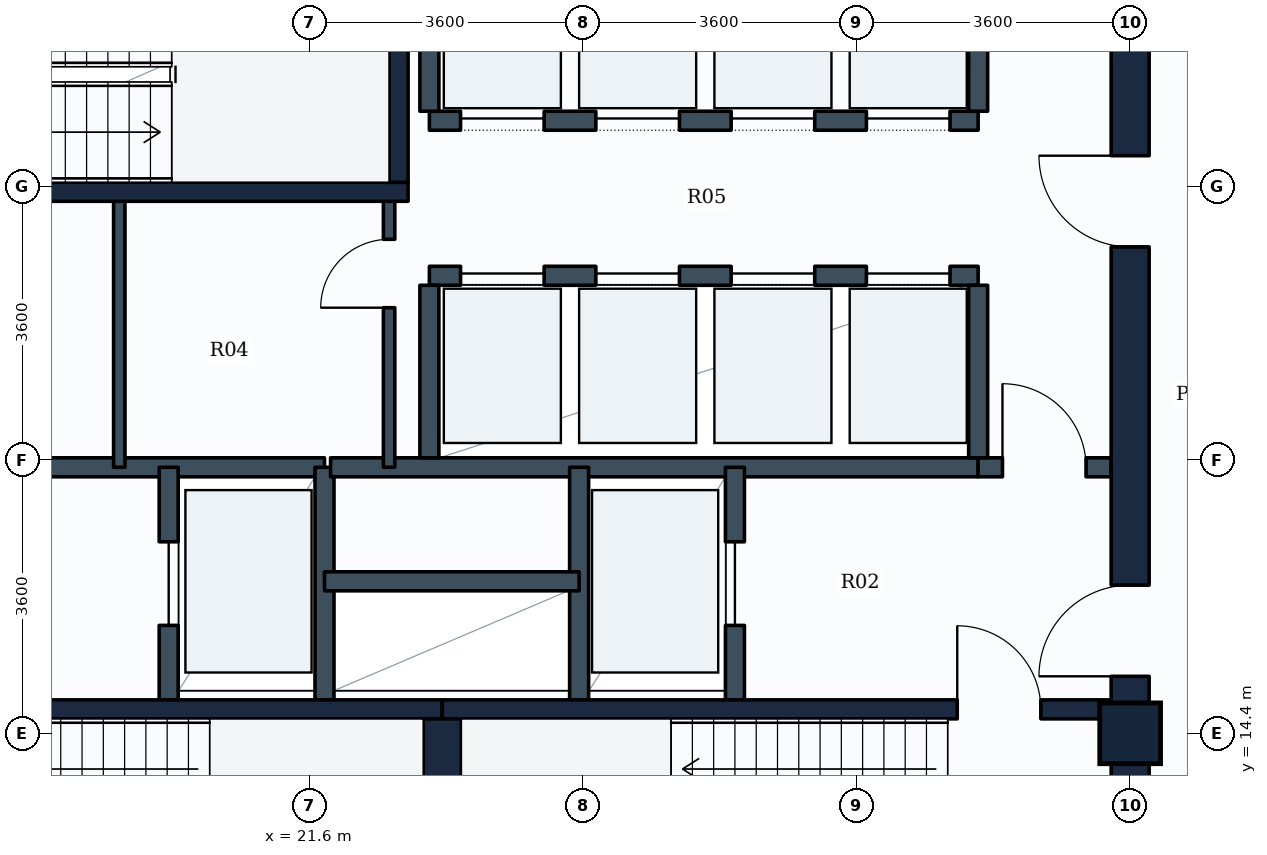
"""IFC4 building model, lengths in metres.
Left out: names, types, materials, properties, quantities, classifications, styles, units other than length and angle.
Written with IfcOpenShell. Run it as: python <this file> out.ifc"""

import sys

from ifc_helpers import new_model, si_unit, direction, frame, frame_2d, origin, origin_2d, place, context, subcontext, project, spatial, rectangle, extrude, element, fill, save


model = new_model("IFC4")
c1 = context("Model", 3, precision=1e-05, world=origin(), true_north=direction((0.0, 1.0)))
c2 = subcontext(c1, "Body", "Model", "MODEL_VIEW")
j1 = project(units=[si_unit("LENGTHUNIT", "METRE"), si_unit("PLANEANGLEUNIT", "RADIAN")], contexts=[c1])
p1 = place(None, origin())
s1 = spatial("IfcSite", under=j1, at=p1, CompositionType="ELEMENT")
p2 = place(p1, origin())
s2 = spatial("IfcBuilding", under=s1, at=p2, CompositionType="ELEMENT")
p3 = place(p2, frame((0.0, 0.0, 209.0)))
s3 = spatial("IfcBuildingStorey", under=s2, at=p3, CompositionType="ELEMENT", Elevation=209.0)
p4 = place(p3, frame((32.4, 14.4, 0.0), z_axis=(0.0, 0.0, 1.0), x_axis=(1.0, 0.0, 0.0)))
e1 = element("IfcColumn", 1, at=p4, inside=s3, PredefinedType="COLUMN", context=c2, shape_type="SweptSolid", body=[
    extrude(rectangle(XDim=0.8, YDim=0.8, at=origin_2d()), origin(), (0.0, 0.0, 1.0), 4.8),
])
p5 = place(p3, frame((32.4, 10.8, 0.0), z_axis=(0.0, 0.0, 1.0), x_axis=(0.0, 1.0, 0.0)))
e2 = element("IfcWall", 2, at=p5, inside=s3, PredefinedType="SHEAR", context=c2, shape_type="SweptSolid", body=[
    extrude(rectangle(XDim=14.4, YDim=0.5, at=frame_2d((7.2, 0.0))), origin(), (0.0, 0.0, 1.0), 4.55),
])
p6 = place(p5, frame((4.35, 0.0, 0.0)))
e3 = element("IfcOpeningElement", 3, at=p6, cuts=e2, PredefinedType="OPENING", context=c2, shape_type="SweptSolid", body=[
    extrude(rectangle(XDim=1.2, YDim=2.1, at=frame_2d((0.6, 1.05))), frame((0.0, 0.26, 0.0), z_axis=(0.0, -1.0, 0.0), x_axis=(1.0, 0.0, 0.0)), (0.0, 0.0, 1.0), 0.52),
])
p7 = place(p5, frame((10.0, 0.0, 0.0)))
e4 = element("IfcOpeningElement", 4, at=p7, cuts=e2, PredefinedType="OPENING", context=c2, shape_type="SweptSolid", body=[
    extrude(rectangle(XDim=1.2, YDim=2.1, at=frame_2d((0.6, 1.05))), frame((0.0, 0.26, 0.0), z_axis=(0.0, -1.0, 0.0), x_axis=(1.0, 0.0, 0.0)), (0.0, 0.0, 1.0), 0.52),
])
p8 = place(p3, frame((14.65, 14.715, 0.0), z_axis=(0.0, 0.0, 1.0), x_axis=(1.0, 0.0, 0.0)))
e5 = element("IfcWall", 5, at=p8, inside=s3, PredefinedType="SHEAR", context=c2, shape_type="SweptSolid", body=[
    extrude(rectangle(XDim=8.7, YDim=0.25, at=frame_2d((4.35, 0.0))), origin(), (0.0, 0.0, 1.0), 4.55),
])
p9 = place(p8, frame((0.705, 0.0, 0.0)))
e6 = element("IfcOpeningElement", 6, at=p9, cuts=e5, PredefinedType="OPENING", context=c2, shape_type="SweptSolid", body=[
    extrude(rectangle(XDim=1.1, YDim=2.1, at=frame_2d((0.55, 1.05))), frame((0.0, 0.135, 0.0), z_axis=(0.0, -1.0, 0.0), x_axis=(1.0, 0.0, 0.0)), (0.0, 0.0, 1.0), 0.27),
])
p10 = place(p3, frame((23.35, 14.715, 0.0), z_axis=(0.0, 0.0, 1.0), x_axis=(1.0, 0.0, 0.0)))
e7 = element("IfcWall", 7, at=p10, inside=s3, PredefinedType="SHEAR", context=c2, shape_type="SweptSolid", body=[
    extrude(rectangle(XDim=8.8, YDim=0.25, at=frame_2d((4.4, 0.0))), origin(), (0.0, 0.0, 1.0), 4.55),
])
p11 = place(p10, frame((6.775, 0.0, 0.0)))
e8 = element("IfcOpeningElement", 8, at=p11, cuts=e7, PredefinedType="OPENING", context=c2, shape_type="SweptSolid", body=[
    extrude(rectangle(XDim=1.1, YDim=2.1, at=frame_2d((0.55, 1.05))), frame((0.0, 0.135, 0.0), z_axis=(0.0, -1.0, 0.0), x_axis=(1.0, 0.0, 0.0)), (0.0, 0.0, 1.0), 0.27),
])
p12 = place(p3, frame((23.35, 11.75, 0.0), z_axis=(0.0, 0.0, 1.0), x_axis=(0.0, 1.0, 0.0)))
e9 = element("IfcWall", 9, at=p12, inside=s3, PredefinedType="SHEAR", context=c2, shape_type="SweptSolid", body=[
    extrude(rectangle(XDim=2.84, YDim=0.5, at=frame_2d((1.42, 0.0))), origin(), (0.0, 0.0, 1.0), 4.55),
])
p13 = place(p3, frame((14.65, 21.525, 0.0), z_axis=(0.0, 0.0, 1.0), x_axis=(1.0, 0.0, 0.0)))
e10 = element("IfcWall", 10, at=p13, inside=s3, PredefinedType="SHEAR", context=c2, shape_type="SweptSolid", body=[
    extrude(rectangle(XDim=8.25, YDim=0.25, at=frame_2d((4.125, 0.0))), origin(), (0.0, 0.0, 1.0), 4.55),
])
p14 = place(p3, frame((22.775, 21.65, 0.0), z_axis=(0.0, 0.0, 1.0), x_axis=(0.0, 1.0, 0.0)))
e11 = element("IfcWall", 11, at=p14, inside=s3, PredefinedType="SHEAR", context=c2, shape_type="SweptSolid", body=[
    extrude(rectangle(XDim=2.84, YDim=0.25, at=frame_2d((1.42, 0.0))), origin(), (0.0, 0.0, 1.0), 4.55),
])
p15 = place(p3, frame((14.65, 17.9, 0.0), z_axis=(0.0, 0.0, 1.0), x_axis=(1.0, 0.0, 0.0)))
e12 = element("IfcWall", 12, at=p15, inside=s3, PredefinedType="PARTITIONING", context=c2, shape_type="SweptSolid", body=[
    extrude(rectangle(XDim=7.15, YDim=0.25, at=frame_2d((3.575, 0.0))), origin(), (0.0, 0.0, 1.0), 4.535),
])
p16 = place(p3, frame((19.75, 14.84, 0.0), z_axis=(0.0, 0.0, 1.0), x_axis=(0.0, 1.0, 0.0)))
e13 = element("IfcWall", 13, at=p16, inside=s3, PredefinedType="PARTITIONING", context=c2, shape_type="SweptSolid", body=[
    extrude(rectangle(XDim=3.06, YDim=0.25, at=frame_2d((1.53, 0.0))), origin(), (0.0, 0.0, 1.0), 4.535),
])
p17 = place(p16, frame((0.98, 0.0, 0.0)))
e14 = element("IfcOpeningElement", 14, at=p17, cuts=e13, PredefinedType="OPENING", context=c2, shape_type="SweptSolid", body=[
    extrude(rectangle(XDim=1.1, YDim=2.1, at=frame_2d((0.55, 1.05))), frame((0.0, 0.135, 0.0), z_axis=(0.0, -1.0, 0.0), x_axis=(1.0, 0.0, 0.0)), (0.0, 0.0, 1.0), 0.27),
])
p18 = place(p3, frame((21.8, 14.84, 0.0), z_axis=(0.0, 0.0, 1.0), x_axis=(0.0, 1.0, 0.0)))
e15 = element("IfcWall", 15, at=p18, inside=s3, PredefinedType="PARTITIONING", context=c2, shape_type="SweptSolid", body=[
    extrude(rectangle(XDim=3.06, YDim=0.25, at=frame_2d((1.53, 0.0))), origin(), (0.0, 0.0, 1.0), 4.535),
])
p19 = place(p3, frame((21.88, 17.9, 0.0), z_axis=(0.0, 0.0, 1.0), x_axis=(1.0, 0.0, 0.0)))
e16 = element("IfcWall", 16, at=p19, inside=s3, PredefinedType="PARTITIONING", context=c2, shape_type="SweptSolid", body=[
    extrude(rectangle(XDim=8.52, YDim=0.25, at=frame_2d((4.26, 0.0))), origin(), (0.0, 0.0, 1.0), 4.535),
])
p20 = place(p3, frame((30.4, 17.9, 0.0), z_axis=(0.0, 0.0, 1.0), x_axis=(1.0, 0.0, 0.0)))
e17 = element("IfcWall", 17, at=p20, inside=s3, PredefinedType="PARTITIONING", context=c2, shape_type="SweptSolid", body=[
    extrude(rectangle(XDim=1.75, YDim=0.25, at=frame_2d((0.875, 0.0))), origin(), (0.0, 0.0, 1.0), 4.535),
])
p21 = place(p20, frame((0.32, 0.0, 0.0)))
e18 = element("IfcOpeningElement", 18, at=p21, cuts=e17, PredefinedType="OPENING", context=c2, shape_type="SweptSolid", body=[
    extrude(rectangle(XDim=1.1, YDim=2.1, at=frame_2d((0.55, 1.05))), frame((0.0, 0.135, 0.0), z_axis=(0.0, -1.0, 0.0), x_axis=(1.0, 0.0, 0.0)), (0.0, 0.0, 1.0), 0.27),
])
p22 = place(p3, frame((25.15, 14.84, 0.0), z_axis=(0.0, 0.0, 1.0), x_axis=(0.0, 1.0, 0.0)))
e19 = element("IfcWall", 19, at=p22, inside=s3, PredefinedType="PARTITIONING", context=c2, shape_type="SweptSolid", body=[
    extrude(rectangle(XDim=3.06, YDim=0.25, at=frame_2d((1.53, 0.0))), origin(), (0.0, 0.0, 1.0), 4.535),
])
p23 = place(p3, frame((27.2, 14.84, 0.0), z_axis=(0.0, 0.0, 1.0), x_axis=(0.0, 1.0, 0.0)))
e20 = element("IfcWall", 20, at=p23, inside=s3, PredefinedType="PARTITIONING", context=c2, shape_type="SweptSolid", body=[
    extrude(rectangle(XDim=3.06, YDim=0.25, at=frame_2d((1.53, 0.0))), origin(), (0.0, 0.0, 1.0), 4.535),
])
p24 = place(p23, frame((0.98, 0.0, 0.0)))
e21 = element("IfcOpeningElement", 21, at=p24, cuts=e20, PredefinedType="OPENING", context=c2, shape_type="SweptSolid", body=[
    extrude(rectangle(XDim=1.1, YDim=2.1, at=frame_2d((0.55, 1.05))), frame((0.0, 0.135, 0.0), z_axis=(0.0, -1.0, 0.0), x_axis=(1.0, 0.0, 0.0)), (0.0, 0.0, 1.0), 0.27),
])
p25 = place(p3, frame((21.8, 16.4, 0.0), z_axis=(0.0, 0.0, 1.0), x_axis=(1.0, 0.0, 0.0)))
e22 = element("IfcWall", 22, at=p25, inside=s3, PredefinedType="PARTITIONING", context=c2, shape_type="SweptSolid", body=[
    extrude(rectangle(XDim=3.35, YDim=0.25, at=frame_2d((1.675, 0.0))), origin(), (0.0, 0.0, 1.0), 4.535),
])
p26 = place(p3, frame((23.18, 20.42, 0.0), z_axis=(0.0, 0.0, 1.0), x_axis=(1.0, 0.0, 0.0)))
e23 = element("IfcWall", 23, at=p26, inside=s3, PredefinedType="PARTITIONING", context=c2, shape_type="SweptSolid", body=[
    extrude(rectangle(XDim=7.22, YDim=0.25, at=frame_2d((3.61, 0.0))), origin(), (0.0, 0.0, 1.0), 4.535),
])
p27 = place(p26, frame((0.41, 0.0, 0.0)))
e24 = element("IfcOpeningElement", 24, at=p27, cuts=e23, PredefinedType="OPENING", context=c2, shape_type="SweptSolid", body=[
    extrude(rectangle(XDim=1.1, YDim=2.1, at=frame_2d((0.55, 1.05))), frame((0.0, 0.135, 0.0), z_axis=(0.0, -1.0, 0.0), x_axis=(1.0, 0.0, 0.0)), (0.0, 0.0, 1.0), 0.27),
])
p28 = place(p26, frame((2.19, 0.0, 0.0)))
e25 = element("IfcOpeningElement", 25, at=p28, cuts=e23, PredefinedType="OPENING", context=c2, shape_type="SweptSolid", body=[
    extrude(rectangle(XDim=1.1, YDim=2.1, at=frame_2d((0.55, 1.05))), frame((0.0, 0.135, 0.0), z_axis=(0.0, -1.0, 0.0), x_axis=(1.0, 0.0, 0.0)), (0.0, 0.0, 1.0), 0.27),
])
p29 = place(p26, frame((3.97, 0.0, 0.0)))
e26 = element("IfcOpeningElement", 26, at=p29, cuts=e23, PredefinedType="OPENING", context=c2, shape_type="SweptSolid", body=[
    extrude(rectangle(XDim=1.1, YDim=2.1, at=frame_2d((0.55, 1.05))), frame((0.0, 0.135, 0.0), z_axis=(0.0, -1.0, 0.0), x_axis=(1.0, 0.0, 0.0)), (0.0, 0.0, 1.0), 0.27),
])
p30 = place(p26, frame((5.75, 0.0, 0.0)))
e27 = element("IfcOpeningElement", 27, at=p30, cuts=e23, PredefinedType="OPENING", context=c2, shape_type="SweptSolid", body=[
    extrude(rectangle(XDim=1.1, YDim=2.1, at=frame_2d((0.55, 1.05))), frame((0.0, 0.135, 0.0), z_axis=(0.0, -1.0, 0.0), x_axis=(1.0, 0.0, 0.0)), (0.0, 0.0, 1.0), 0.27),
])
for number, where, z_axis, x_axis in (
    (28, (23.18, 18.025, 0.0), (0.0, 0.0, 1.0), (0.0, 1.0, 0.0)),
    (29, (30.4, 18.025, 0.0), (0.0, 0.0, 1.0), (0.0, 1.0, 0.0)),
):
    element("IfcWall", number, at=place(p3, frame(where, z_axis=z_axis, x_axis=x_axis)), inside=s3, PredefinedType="PARTITIONING", context=c2, shape_type="SweptSolid", body=[
        extrude(rectangle(XDim=2.27, YDim=0.25, at=frame_2d((1.135, 0.0))), origin(), (0.0, 0.0, 1.0), 4.535),
    ])
p31 = place(p3, frame((23.18, 22.46, 0.0), z_axis=(0.0, 0.0, 1.0), x_axis=(1.0, 0.0, 0.0)))
e30 = element("IfcWall", 30, at=p31, inside=s3, PredefinedType="PARTITIONING", context=c2, shape_type="SweptSolid", body=[
    extrude(rectangle(XDim=7.22, YDim=0.25, at=frame_2d((3.61, 0.0))), origin(), (0.0, 0.0, 1.0), 4.535),
])
p32 = place(p31, frame((0.41, 0.0, 0.0)))
e31 = element("IfcOpeningElement", 31, at=p32, cuts=e30, PredefinedType="OPENING", context=c2, shape_type="SweptSolid", body=[
    extrude(rectangle(XDim=1.1, YDim=2.1, at=frame_2d((0.55, 1.05))), frame((0.0, 0.135, 0.0), z_axis=(0.0, -1.0, 0.0), x_axis=(1.0, 0.0, 0.0)), (0.0, 0.0, 1.0), 0.27),
])
p33 = place(p31, frame((2.19, 0.0, 0.0)))
e32 = element("IfcOpeningElement", 32, at=p33, cuts=e30, PredefinedType="OPENING", context=c2, shape_type="SweptSolid", body=[
    extrude(rectangle(XDim=1.1, YDim=2.1, at=frame_2d((0.55, 1.05))), frame((0.0, 0.135, 0.0), z_axis=(0.0, -1.0, 0.0), x_axis=(1.0, 0.0, 0.0)), (0.0, 0.0, 1.0), 0.27),
])
p34 = place(p31, frame((3.97, 0.0, 0.0)))
e33 = element("IfcOpeningElement", 33, at=p34, cuts=e30, PredefinedType="OPENING", context=c2, shape_type="SweptSolid", body=[
    extrude(rectangle(XDim=1.1, YDim=2.1, at=frame_2d((0.55, 1.05))), frame((0.0, 0.135, 0.0), z_axis=(0.0, -1.0, 0.0), x_axis=(1.0, 0.0, 0.0)), (0.0, 0.0, 1.0), 0.27),
])
p35 = place(p31, frame((5.75, 0.0, 0.0)))
e34 = element("IfcOpeningElement", 34, at=p35, cuts=e30, PredefinedType="OPENING", context=c2, shape_type="SweptSolid", body=[
    extrude(rectangle(XDim=1.1, YDim=2.1, at=frame_2d((0.55, 1.05))), frame((0.0, 0.135, 0.0), z_axis=(0.0, -1.0, 0.0), x_axis=(1.0, 0.0, 0.0)), (0.0, 0.0, 1.0), 0.27),
])
for number, where, z_axis, x_axis in (
    (35, (23.18, 22.585, 0.0), (0.0, 0.0, 1.0), (0.0, 1.0, 0.0)),
    (36, (30.4, 22.585, 0.0), (0.0, 0.0, 1.0), (0.0, 1.0, 0.0)),
):
    element("IfcWall", number, at=place(p3, frame(where, z_axis=z_axis, x_axis=x_axis)), inside=s3, PredefinedType="PARTITIONING", context=c2, shape_type="SweptSolid", body=[
        extrude(rectangle(XDim=2.315, YDim=0.25, at=frame_2d((1.157, 0.0))), origin(), (0.0, 0.0, 1.0), 4.535),
    ])
p36 = place(p3, frame((22.65, 17.9, 0.0), z_axis=(0.0, 0.0, 1.0), x_axis=(0.0, 1.0, 0.0)))
e37 = element("IfcWall", 37, at=p36, inside=s3, PredefinedType="PARTITIONING", context=c2, shape_type="SweptSolid", body=[
    extrude(rectangle(XDim=3.625, YDim=0.15, at=frame_2d((1.812, 0.0))), origin(), (0.0, 0.0, 1.0), 4.535),
])
p37 = place(p36, frame((2.1, 0.0, 0.0)))
e38 = element("IfcOpeningElement", 38, at=p37, cuts=e37, PredefinedType="OPENING", context=c2, shape_type="SweptSolid", body=[
    extrude(rectangle(XDim=0.9, YDim=2.1, at=frame_2d((0.45, 1.05))), frame((0.0, 0.085, 0.0), z_axis=(0.0, -1.0, 0.0), x_axis=(1.0, 0.0, 0.0)), (0.0, 0.0, 1.0), 0.17),
])
p38 = place(p3, frame((19.1, 17.9, 0.0), z_axis=(0.0, 0.0, 1.0), x_axis=(0.0, 1.0, 0.0)))
e39 = element("IfcWall", 39, at=p38, inside=s3, PredefinedType="PARTITIONING", context=c2, shape_type="SweptSolid", body=[
    extrude(rectangle(XDim=3.625, YDim=0.15, at=frame_2d((1.812, 0.0))), origin(), (0.0, 0.0, 1.0), 4.535),
])
p39 = place(p11, origin())
e40 = element("IfcDoor", 40, at=p39, inside=s3, OperationType="SINGLE_SWING_LEFT", PredefinedType="DOOR", context=c2, shape_type="SweptSolid", body=[
    extrude(rectangle(XDim=1.1, YDim=2.1, at=frame_2d((0.55, 1.05))), frame((0.0, 0.025, 0.0), z_axis=(0.0, -1.0, 0.0), x_axis=(1.0, 0.0, 0.0)), (0.0, 0.0, 1.0), 0.05),
])
fill(e8, e40)
p40 = place(p17, origin())
e41 = element("IfcDoor", 41, at=p40, inside=s3, OperationType="SLIDING_TO_LEFT", PredefinedType="DOOR", context=c2, shape_type="SweptSolid", body=[
    extrude(rectangle(XDim=1.1, YDim=2.1, at=frame_2d((0.55, 1.05))), frame((0.0, 0.025, 0.0), z_axis=(0.0, -1.0, 0.0), x_axis=(1.0, 0.0, 0.0)), (0.0, 0.0, 1.0), 0.05),
])
fill(e14, e41)
p41 = place(p24, origin())
e42 = element("IfcDoor", 42, at=p41, inside=s3, OperationType="SLIDING_TO_LEFT", PredefinedType="DOOR", context=c2, shape_type="SweptSolid", body=[
    extrude(rectangle(XDim=1.1, YDim=2.1, at=frame_2d((0.55, 1.05))), frame((0.0, 0.025, 0.0), z_axis=(0.0, -1.0, 0.0), x_axis=(1.0, 0.0, 0.0)), (0.0, 0.0, 1.0), 0.05),
])
fill(e21, e42)
p42 = place(p6, origin())
e43 = element("IfcDoor", 43, at=p42, inside=s3, OperationType="SINGLE_SWING_LEFT", PredefinedType="DOOR", context=c2, shape_type="SweptSolid", body=[
    extrude(rectangle(XDim=1.2, YDim=2.1, at=frame_2d((0.6, 1.05))), frame((0.0, 0.025, 0.0), z_axis=(0.0, -1.0, 0.0), x_axis=(1.0, 0.0, 0.0)), (0.0, 0.0, 1.0), 0.05),
])
fill(e3, e43)
p43 = place(p21, origin())
e44 = element("IfcDoor", 44, at=p43, inside=s3, OperationType="SINGLE_SWING_LEFT", PredefinedType="DOOR", context=c2, shape_type="SweptSolid", body=[
    extrude(rectangle(XDim=1.1, YDim=2.1, at=frame_2d((0.55, 1.05))), frame((0.0, 0.025, 0.0), z_axis=(0.0, -1.0, 0.0), x_axis=(1.0, 0.0, 0.0)), (0.0, 0.0, 1.0), 0.05),
])
fill(e18, e44)
p44 = place(p27, origin())
e45 = element("IfcDoor", 45, at=p44, inside=s3, OperationType="SLIDING_TO_LEFT", PredefinedType="DOOR", context=c2, shape_type="SweptSolid", body=[
    extrude(rectangle(XDim=1.1, YDim=2.1, at=frame_2d((0.55, 1.05))), frame((0.0, 0.025, 0.0), z_axis=(0.0, -1.0, 0.0), x_axis=(1.0, 0.0, 0.0)), (0.0, 0.0, 1.0), 0.05),
])
fill(e24, e45)
p45 = place(p28, origin())
e46 = element("IfcDoor", 46, at=p45, inside=s3, OperationType="SLIDING_TO_LEFT", PredefinedType="DOOR", context=c2, shape_type="SweptSolid", body=[
    extrude(rectangle(XDim=1.1, YDim=2.1, at=frame_2d((0.55, 1.05))), frame((0.0, 0.025, 0.0), z_axis=(0.0, -1.0, 0.0), x_axis=(1.0, 0.0, 0.0)), (0.0, 0.0, 1.0), 0.05),
])
fill(e25, e46)
p46 = place(p29, origin())
e47 = element("IfcDoor", 47, at=p46, inside=s3, OperationType="SLIDING_TO_LEFT", PredefinedType="DOOR", context=c2, shape_type="SweptSolid", body=[
    extrude(rectangle(XDim=1.1, YDim=2.1, at=frame_2d((0.55, 1.05))), frame((0.0, 0.025, 0.0), z_axis=(0.0, -1.0, 0.0), x_axis=(1.0, 0.0, 0.0)), (0.0, 0.0, 1.0), 0.05),
])
fill(e26, e47)
p47 = place(p30, origin())
e48 = element("IfcDoor", 48, at=p47, inside=s3, OperationType="SLIDING_TO_LEFT", PredefinedType="DOOR", context=c2, shape_type="SweptSolid", body=[
    extrude(rectangle(XDim=1.1, YDim=2.1, at=frame_2d((0.55, 1.05))), frame((0.0, 0.025, 0.0), z_axis=(0.0, -1.0, 0.0), x_axis=(1.0, 0.0, 0.0)), (0.0, 0.0, 1.0), 0.05),
])
fill(e27, e48)
p48 = place(p32, origin())
e49 = element("IfcDoor", 49, at=p48, inside=s3, OperationType="SLIDING_TO_LEFT", PredefinedType="DOOR", context=c2, shape_type="SweptSolid", body=[
    extrude(rectangle(XDim=1.1, YDim=2.1, at=frame_2d((0.55, 1.05))), frame((0.0, 0.025, 0.0), z_axis=(0.0, -1.0, 0.0), x_axis=(1.0, 0.0, 0.0)), (0.0, 0.0, 1.0), 0.05),
])
fill(e31, e49)
p49 = place(p33, origin())
e50 = element("IfcDoor", 50, at=p49, inside=s3, OperationType="SLIDING_TO_LEFT", PredefinedType="DOOR", context=c2, shape_type="SweptSolid", body=[
    extrude(rectangle(XDim=1.1, YDim=2.1, at=frame_2d((0.55, 1.05))), frame((0.0, 0.025, 0.0), z_axis=(0.0, -1.0, 0.0), x_axis=(1.0, 0.0, 0.0)), (0.0, 0.0, 1.0), 0.05),
])
fill(e32, e50)
p50 = place(p34, origin())
e51 = element("IfcDoor", 51, at=p50, inside=s3, OperationType="SLIDING_TO_LEFT", PredefinedType="DOOR", context=c2, shape_type="SweptSolid", body=[
    extrude(rectangle(XDim=1.1, YDim=2.1, at=frame_2d((0.55, 1.05))), frame((0.0, 0.025, 0.0), z_axis=(0.0, -1.0, 0.0), x_axis=(1.0, 0.0, 0.0)), (0.0, 0.0, 1.0), 0.05),
])
fill(e33, e51)
p51 = place(p35, origin())
e52 = element("IfcDoor", 52, at=p51, inside=s3, OperationType="SLIDING_TO_LEFT", PredefinedType="DOOR", context=c2, shape_type="SweptSolid", body=[
    extrude(rectangle(XDim=1.1, YDim=2.1, at=frame_2d((0.55, 1.05))), frame((0.0, 0.025, 0.0), z_axis=(0.0, -1.0, 0.0), x_axis=(1.0, 0.0, 0.0)), (0.0, 0.0, 1.0), 0.05),
])
fill(e34, e52)
p52 = place(p7, origin())
e53 = element("IfcDoor", 53, at=p52, inside=s3, OperationType="SINGLE_SWING_RIGHT", PredefinedType="DOOR", context=c2, shape_type="SweptSolid", body=[
    extrude(rectangle(XDim=1.2, YDim=2.1, at=frame_2d((0.6, 1.05))), frame((0.0, 0.025, 0.0), z_axis=(0.0, -1.0, 0.0), x_axis=(1.0, 0.0, 0.0)), (0.0, 0.0, 1.0), 0.05),
])
fill(e4, e53)
p53 = place(p37, origin())
e54 = element("IfcDoor", 54, at=p53, inside=s3, OperationType="SINGLE_SWING_LEFT", PredefinedType="DOOR", context=c2, shape_type="SweptSolid", body=[
    extrude(rectangle(XDim=0.9, YDim=2.1, at=frame_2d((0.45, 1.05))), frame((0.0, 0.025, 0.0), z_axis=(0.0, -1.0, 0.0), x_axis=(1.0, 0.0, 0.0)), (0.0, 0.0, 1.0), 0.05),
])
fill(e38, e54)
save(model, sys.argv[1])
